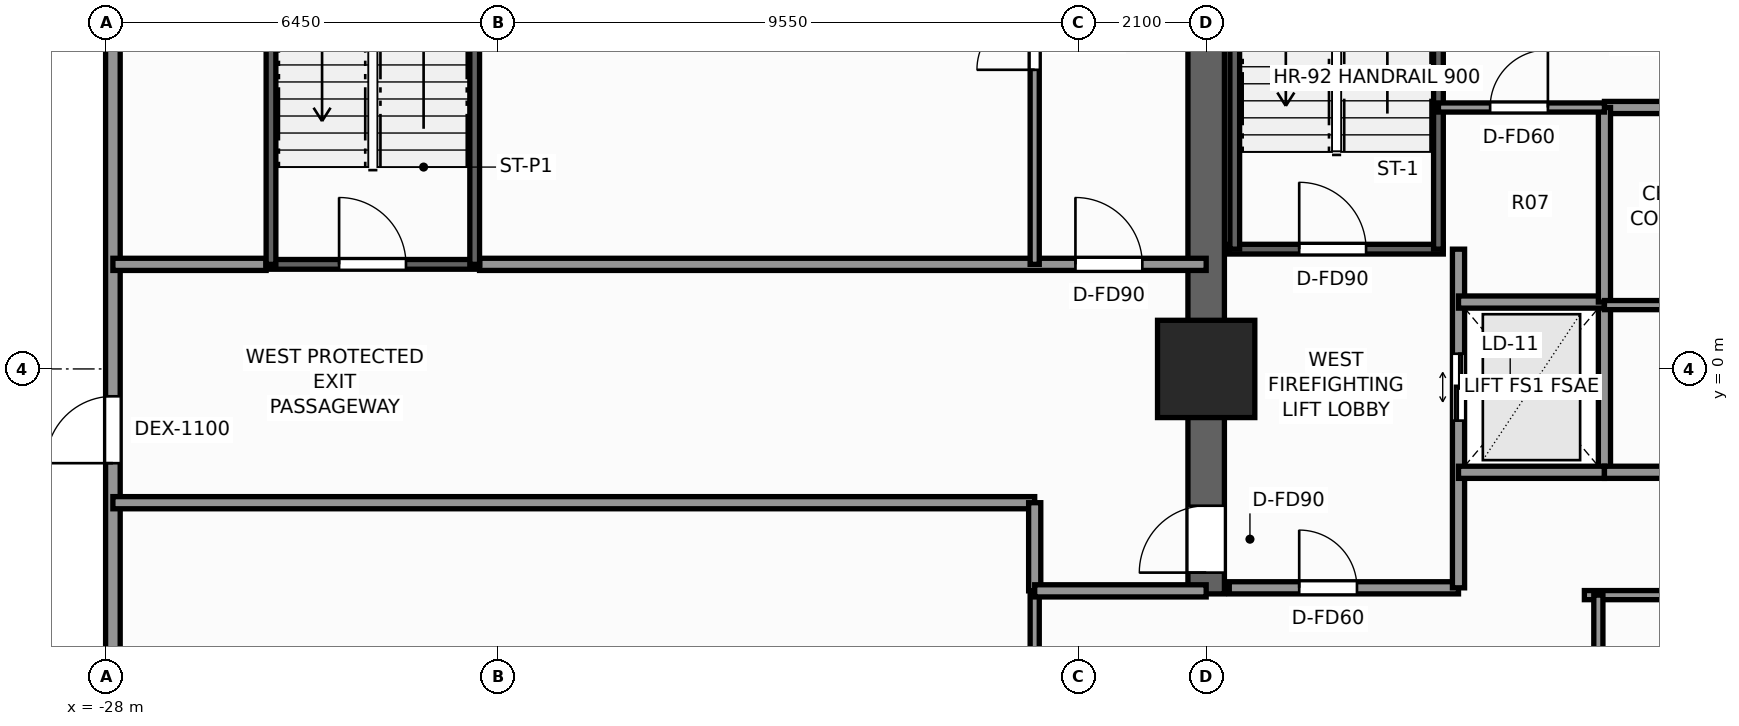
"""IFC4 building model, lengths in metres.
Left out: names, types, materials, properties, quantities, classifications, styles, units other than length and angle.
Written with IfcOpenShell. Run it as: python <this file> out.ifc"""

import sys

from ifc_helpers import new_model, si_unit, direction, frame, frame_2d, origin, origin_2d, place, context, subcontext, project, spatial, rectangle, extrude, element, fill, save


model = new_model("IFC4")
c1 = context("Model", 3, precision=1e-05, world=origin(), true_north=direction((0.0, 1.0)))
c2 = subcontext(c1, "Body", "Model", "MODEL_VIEW")
j1 = project(units=[si_unit("LENGTHUNIT", "METRE"), si_unit("PLANEANGLEUNIT", "RADIAN")], contexts=[c1])
p1 = place(None, origin())
s1 = spatial("IfcSite", under=j1, at=p1, CompositionType="ELEMENT")
p2 = place(p1, origin())
s2 = spatial("IfcBuilding", under=s1, at=p2, CompositionType="ELEMENT")
p3 = place(p2, origin())
s3 = spatial("IfcBuildingStorey", under=s2, at=p3, CompositionType="ELEMENT", Elevation=0.0)
p4 = place(p3, frame((-9.9, -3.7, 0.0), z_axis=(0.0, 0.0, 1.0), x_axis=(0.0, 1.0, 0.0)))
e1 = element("IfcWall", 1, at=p4, inside=s3, PredefinedType="SHEAR", context=c2, shape_type="SweptSolid", body=[
    extrude(rectangle(XDim=13.3, YDim=0.6, at=frame_2d((6.65, 0.0))), origin(), (0.0, 0.0, 1.0), 5.5),
])
p5 = place(p4, frame((0.35, 0.0, 0.0)))
e2 = element("IfcOpeningElement", 2, at=p5, cuts=e1, PredefinedType="OPENING", context=c2, shape_type="SweptSolid", body=[
    extrude(rectangle(XDim=1.1, YDim=2.2, at=frame_2d((0.55, 1.1))), frame((0.0, 0.31, 0.0), z_axis=(0.0, -1.0, 0.0), x_axis=(1.0, 0.0, 0.0)), (0.0, 0.0, 1.0), 0.62),
])
p6 = place(p3, frame((-9.9, 0.0, 0.0), z_axis=(0.0, 0.0, 1.0), x_axis=(1.0, 0.0, 0.0)))
e3 = element("IfcColumn", 3, at=p6, inside=s3, PredefinedType="COLUMN", context=c2, shape_type="SweptSolid", body=[
    extrude(rectangle(XDim=1.6, YDim=1.6, at=origin_2d()), origin(), (0.0, 0.0, 1.0), 5.5),
])
p7 = place(p3, frame((-27.88, -28.4, 0.0), z_axis=(0.0, 0.0, 1.0), x_axis=(0.0, 1.0, 0.0)))
e4 = element("IfcWall", 4, at=p7, inside=s3, PredefinedType="STANDARD", context=c2, shape_type="SweptSolid", body=[
    extrude(rectangle(XDim=56.8, YDim=0.24, at=frame_2d((28.4, 0.0))), origin(), (0.0, 0.0, 1.0), 4.748),
])
p8 = place(p7, frame((26.85, 0.0, 0.0)))
e5 = element("IfcOpeningElement", 5, at=p8, cuts=e4, PredefinedType="OPENING", context=c2, shape_type="SweptSolid", body=[
    extrude(rectangle(XDim=1.1, YDim=2.2, at=frame_2d((0.55, 1.1))), frame((0.0, 0.13, 0.0), z_axis=(0.0, -1.0, 0.0), x_axis=(1.0, 0.0, 0.0)), (0.0, 0.0, 1.0), 0.26),
])
p9 = place(p7, frame((40.45, 0.0, 0.0)))
e6 = element("IfcOpeningElement", 6, at=p9, cuts=e4, PredefinedType="OPENING", context=c2, shape_type="SweptSolid", body=[
    extrude(rectangle(XDim=1.1, YDim=2.2, at=frame_2d((0.55, 1.1))), frame((0.0, 0.13, 0.0), z_axis=(0.0, -1.0, 0.0), x_axis=(1.0, 0.0, 0.0)), (0.0, 0.0, 1.0), 0.26),
])
p10 = place(p7, frame((47.35, 0.0, 0.0)))
e7 = element("IfcOpeningElement", 7, at=p10, cuts=e4, PredefinedType="OPENING", context=c2, shape_type="SweptSolid", body=[
    extrude(rectangle(XDim=1.1, YDim=2.2, at=frame_2d((0.55, 1.1))), frame((0.0, 0.13, 0.0), z_axis=(0.0, -1.0, 0.0), x_axis=(1.0, 0.0, 0.0)), (0.0, 0.0, 1.0), 0.26),
])
p11 = place(p7, frame((6.0, 0.0, 0.75)))
e8 = element("IfcOpeningElement", 8, at=p11, cuts=e4, PredefinedType="OPENING", context=c2, shape_type="SweptSolid", body=[
    extrude(rectangle(XDim=1.8, YDim=2.4, at=frame_2d((0.9, 1.2))), frame((0.0, 0.13, 0.0), z_axis=(0.0, -1.0, 0.0), x_axis=(1.0, 0.0, 0.0)), (0.0, 0.0, 1.0), 0.26),
])
p12 = place(p7, frame((11.0, 0.0, 0.75)))
e9 = element("IfcOpeningElement", 9, at=p12, cuts=e4, PredefinedType="OPENING", context=c2, shape_type="SweptSolid", body=[
    extrude(rectangle(XDim=1.8, YDim=2.4, at=frame_2d((0.9, 1.2))), frame((0.0, 0.13, 0.0), z_axis=(0.0, -1.0, 0.0), x_axis=(1.0, 0.0, 0.0)), (0.0, 0.0, 1.0), 0.26),
])
p13 = place(p7, frame((21.7, 0.0, 0.75)))
e10 = element("IfcOpeningElement", 10, at=p13, cuts=e4, PredefinedType="OPENING", context=c2, shape_type="SweptSolid", body=[
    extrude(rectangle(XDim=1.8, YDim=2.4, at=frame_2d((0.9, 1.2))), frame((0.0, 0.13, 0.0), z_axis=(0.0, -1.0, 0.0), x_axis=(1.0, 0.0, 0.0)), (0.0, 0.0, 1.0), 0.26),
])
p14 = place(p3, frame((-9.52, 1.97, 0.0), z_axis=(0.0, 0.0, 1.0), x_axis=(1.0, 0.0, 0.0)))
e11 = element("IfcWall", 11, at=p14, inside=s3, PredefinedType="SHEAR", context=c2, shape_type="SweptSolid", body=[
    extrude(rectangle(XDim=3.52, YDim=0.16, at=frame_2d((1.76, 0.0))), origin(), (0.0, 0.0, 1.0), 5.5),
])
p15 = place(p14, frame((1.15, 0.0, 0.0)))
e12 = element("IfcOpeningElement", 12, at=p15, cuts=e11, PredefinedType="OPENING", context=c2, shape_type="SweptSolid", body=[
    extrude(rectangle(XDim=1.1, YDim=2.2, at=frame_2d((0.55, 1.1))), frame((0.0, 0.09, 0.0), z_axis=(0.0, -1.0, 0.0), x_axis=(1.0, 0.0, 0.0)), (0.0, 0.0, 1.0), 0.18),
])
for number, where, z_axis, x_axis in (
    (13, (-9.43, 1.97, 0.0), (0.0, 0.0, 1.0), (0.0, 1.0, 0.0)),
    (14, (-6.08, 1.97, 0.0), (0.0, 0.0, 1.0), (0.0, 1.0, 0.0)),
):
    element("IfcWall", number, at=place(p3, frame(where, z_axis=z_axis, x_axis=x_axis)), inside=s3, PredefinedType="SHEAR", context=c2, shape_type="SweptSolid", body=[
        extrude(rectangle(XDim=7.56, YDim=0.16, at=frame_2d((3.78, 0.0))), origin(), (0.0, 0.0, 1.0), 5.5),
    ])
p16 = place(p3, frame((-9.52, -3.6, 0.0), z_axis=(0.0, 0.0, 1.0), x_axis=(1.0, 0.0, 0.0)))
e15 = element("IfcWall", 15, at=p16, inside=s3, PredefinedType="SOLIDWALL", context=c2, shape_type="SweptSolid", body=[
    extrude(rectangle(XDim=3.77, YDim=0.2, at=frame_2d((1.885, 0.0))), origin(), (0.0, 0.0, 1.0), 5.22),
])
p17 = place(p16, frame((1.15, 0.0, 0.0)))
e16 = element("IfcOpeningElement", 16, at=p17, cuts=e15, PredefinedType="OPENING", context=c2, shape_type="SweptSolid", body=[
    extrude(rectangle(XDim=0.95, YDim=2.06, at=frame_2d((0.475, 1.03))), frame((0.0, 0.11, 0.0), z_axis=(0.0, -1.0, 0.0), x_axis=(1.0, 0.0, 0.0)), (0.0, 0.0, 1.0), 0.22),
])
p18 = place(p3, frame((-5.75, -3.6, 0.0), z_axis=(0.0, 0.0, 1.0), x_axis=(0.0, 1.0, 0.0)))
e17 = element("IfcWall", 17, at=p18, inside=s3, PredefinedType="SOLIDWALL", context=c2, shape_type="SweptSolid", body=[
    extrude(rectangle(XDim=5.57, YDim=0.2, at=frame_2d((2.785, 0.0))), origin(), (0.0, 0.0, 1.0), 5.22),
])
p19 = place(p18, frame((2.75, 0.0, 0.0)))
e18 = element("IfcOpeningElement", 18, at=p19, cuts=e17, PredefinedType="OPENING", context=c2, shape_type="SweptSolid", body=[
    extrude(rectangle(XDim=1.1, YDim=2.2, at=frame_2d((0.55, 1.1))), frame((0.0, 0.11, 0.0), z_axis=(0.0, -1.0, 0.0), x_axis=(1.0, 0.0, 0.0)), (0.0, 0.0, 1.0), 0.22),
])
p20 = place(p3, frame((-3.35, -1.7, 0.0), z_axis=(0.0, 0.0, 1.0), x_axis=(0.0, 1.0, 0.0)))
e19 = element("IfcWall", 19, at=p20, inside=s3, PredefinedType="SOLIDWALL", context=c2, shape_type="SweptSolid", body=[
    extrude(rectangle(XDim=2.8, YDim=0.2, at=frame_2d((1.4, 0.0))), origin(), (0.0, 0.0, 1.0), 5.22),
])
for number, where, z_axis, x_axis in (
    (20, (-5.75, -1.7, 0.0), (0.0, 0.0, 1.0), (1.0, 0.0, 0.0)),
    (21, (-5.75, 1.1, 0.0), (0.0, 0.0, 1.0), (1.0, 0.0, 0.0)),
):
    element("IfcWall", number, at=place(p3, frame(where, z_axis=z_axis, x_axis=x_axis)), inside=s3, PredefinedType="SOLIDWALL", context=c2, shape_type="SweptSolid", body=[
        extrude(rectangle(XDim=2.4, YDim=0.2, at=frame_2d((1.2, 0.0))), origin(), (0.0, 0.0, 1.0), 5.22),
    ])
p21 = place(p3, frame((-3.35, 4.3, 0.0), z_axis=(0.0, 0.0, 1.0), x_axis=(1.0, 0.0, 0.0)))
e22 = element("IfcWall", 22, at=p21, inside=s3, PredefinedType="SOLIDWALL", context=c2, shape_type="SweptSolid", body=[
    extrude(rectangle(XDim=6.7, YDim=0.2, at=frame_2d((3.35, 0.0))), origin(), (0.0, 0.0, 1.0), 5.22),
])
p22 = place(p21, frame((4.35, 0.0, 0.0)))
e23 = element("IfcOpeningElement", 23, at=p22, cuts=e22, PredefinedType="OPENING", context=c2, shape_type="SweptSolid", body=[
    extrude(rectangle(XDim=0.95, YDim=2.06, at=frame_2d((0.475, 1.03))), frame((0.0, 0.11, 0.0), z_axis=(0.0, -1.0, 0.0), x_axis=(1.0, 0.0, 0.0)), (0.0, 0.0, 1.0), 0.22),
])
p23 = place(p3, frame((-3.35, -1.7, 0.0), z_axis=(0.0, 0.0, 1.0), x_axis=(1.0, 0.0, 0.0)))
e24 = element("IfcWall", 24, at=p23, inside=s3, PredefinedType="SOLIDWALL", context=c2, shape_type="SweptSolid", body=[
    extrude(rectangle(XDim=6.7, YDim=0.2, at=frame_2d((3.35, 0.0))), origin(), (0.0, 0.0, 1.0), 5.22),
])
p24 = place(p3, frame((-3.35, 1.1, 0.0), z_axis=(0.0, 0.0, 1.0), x_axis=(0.0, 1.0, 0.0)))
e25 = element("IfcWall", 25, at=p24, inside=s3, PredefinedType="SOLIDWALL", context=c2, shape_type="SweptSolid", body=[
    extrude(rectangle(XDim=3.2, YDim=0.2, at=frame_2d((1.6, 0.0))), origin(), (0.0, 0.0, 1.0), 5.22),
])
p25 = place(p3, frame((-3.35, 1.05, 0.0), z_axis=(0.0, 0.0, 1.0), x_axis=(1.0, 0.0, 0.0)))
e26 = element("IfcWall", 26, at=p25, inside=s3, PredefinedType="PARTITIONING", context=c2, shape_type="SweptSolid", body=[
    extrude(rectangle(XDim=6.7, YDim=0.15, at=frame_2d((3.35, 0.0))), origin(), (0.0, 0.0, 1.0), 5.22),
])
p26 = place(p25, frame((4.2, 0.0, 0.0)))
e27 = element("IfcOpeningElement", 27, at=p26, cuts=e26, PredefinedType="OPENING", context=c2, shape_type="SweptSolid", body=[
    extrude(rectangle(XDim=0.85, YDim=2.03, at=frame_2d((0.425, 1.015))), frame((0.0, 0.085, 0.0), z_axis=(0.0, -1.0, 0.0), x_axis=(1.0, 0.0, 0.0)), (0.0, 0.0, 1.0), 0.17),
])
p27 = place(p3, frame((-3.68, -3.72, 0.0), z_axis=(0.0, 0.0, 1.0), x_axis=(1.0, 0.0, 0.0)))
e28 = element("IfcWall", 28, at=p27, inside=s3, PredefinedType="PARTITIONING", context=c2, shape_type="SweptSolid", body=[
    extrude(rectangle(XDim=7.36, YDim=0.15, at=frame_2d((3.68, 0.0))), origin(), (0.0, 0.0, 1.0), 5.22),
])
p28 = place(p3, frame((-3.45, -6.08, 0.0), z_axis=(0.0, 0.0, 1.0), x_axis=(0.0, 1.0, 0.0)))
e29 = element("IfcWall", 29, at=p28, inside=s3, PredefinedType="PARTITIONING", context=c2, shape_type="SweptSolid", body=[
    extrude(rectangle(XDim=2.36, YDim=0.15, at=frame_2d((1.18, 0.0))), origin(), (0.0, 0.0, 1.0), 5.22),
])
p29 = place(p3, frame((-6.08, 4.3, 0.0), z_axis=(0.0, 0.0, 1.0), x_axis=(1.0, 0.0, 0.0)))
e30 = element("IfcWall", 30, at=p29, inside=s3, PredefinedType="PARTITIONING", context=c2, shape_type="SweptSolid", body=[
    extrude(rectangle(XDim=2.73, YDim=0.15, at=frame_2d((1.365, 0.0))), origin(), (0.0, 0.0, 1.0), 5.22),
])
p30 = place(p29, frame((0.85, 0.0, 0.0)))
e31 = element("IfcOpeningElement", 31, at=p30, cuts=e30, PredefinedType="OPENING", context=c2, shape_type="SweptSolid", body=[
    extrude(rectangle(XDim=0.95, YDim=2.06, at=frame_2d((0.475, 1.03))), frame((0.0, 0.085, 0.0), z_axis=(0.0, -1.0, 0.0), x_axis=(1.0, 0.0, 0.0)), (0.0, 0.0, 1.0), 0.17),
])
p31 = place(p3, frame((-12.72, -28.28, 0.0), z_axis=(0.0, 0.0, 1.0), x_axis=(0.0, 1.0, 0.0)))
e32 = element("IfcWall", 32, at=p31, inside=s3, PredefinedType="PARTITIONING", context=c2, shape_type="SweptSolid", body=[
    extrude(rectangle(XDim=24.63, YDim=0.15, at=frame_2d((12.315, 0.0))), origin(), (0.0, 0.0, 1.0), 4.278),
])
p32 = place(p31, frame((10.0, 0.0, 0.0)))
e33 = element("IfcOpeningElement", 33, at=p32, cuts=e32, PredefinedType="OPENING", context=c2, shape_type="SweptSolid", body=[
    extrude(rectangle(XDim=1.6, YDim=2.3, at=frame_2d((0.8, 1.15))), frame((0.0, 0.085, 0.0), z_axis=(0.0, -1.0, 0.0), x_axis=(1.0, 0.0, 0.0)), (0.0, 0.0, 1.0), 0.17),
])
p33 = place(p3, frame((-27.88, -2.2, 0.0), z_axis=(0.0, 0.0, 1.0), x_axis=(1.0, 0.0, 0.0)))
e34 = element("IfcWall", 34, at=p33, inside=s3, PredefinedType="SOLIDWALL", context=c2, shape_type="SweptSolid", body=[
    extrude(rectangle(XDim=15.16, YDim=0.2, at=frame_2d((7.58, 0.0))), origin(), (0.0, 0.0, 1.0), 4.589),
])
p34 = place(p3, frame((-12.72, -3.65, 0.0), z_axis=(0.0, 0.0, 1.0), x_axis=(0.0, 1.0, 0.0)))
e35 = element("IfcWall", 35, at=p34, inside=s3, PredefinedType="SOLIDWALL", context=c2, shape_type="SweptSolid", body=[
    extrude(rectangle(XDim=1.45, YDim=0.2, at=frame_2d((0.725, 0.0))), origin(), (0.0, 0.0, 1.0), 4.745),
])
p35 = place(p3, frame((-12.72, -3.65, 0.0), z_axis=(0.0, 0.0, 1.0), x_axis=(1.0, 0.0, 0.0)))
e36 = element("IfcWall", 36, at=p35, inside=s3, PredefinedType="SOLIDWALL", context=c2, shape_type="SweptSolid", body=[
    extrude(rectangle(XDim=2.82, YDim=0.2, at=frame_2d((1.41, 0.0))), origin(), (0.0, 0.0, 1.0), 4.255),
])
p36 = place(p3, frame((-27.88, 1.72, 0.0), z_axis=(0.0, 0.0, 1.0), x_axis=(1.0, 0.0, 0.0)))
e37 = element("IfcWall", 37, at=p36, inside=s3, PredefinedType="SOLIDWALL", context=c2, shape_type="SweptSolid", body=[
    extrude(rectangle(XDim=2.52, YDim=0.2, at=frame_2d((1.26, 0.0))), origin(), (0.0, 0.0, 1.0), 4.589),
])
p37 = place(p3, frame((-21.85, 1.72, 0.0), z_axis=(0.0, 0.0, 1.0), x_axis=(1.0, 0.0, 0.0)))
e38 = element("IfcWall", 38, at=p37, inside=s3, PredefinedType="SOLIDWALL", context=c2, shape_type="SweptSolid", body=[
    extrude(rectangle(XDim=11.95, YDim=0.2, at=frame_2d((5.975, 0.0))), origin(), (0.0, 0.0, 1.0), 5.22),
])
p38 = place(p37, frame((9.8, 0.0, 0.0)))
e39 = element("IfcOpeningElement", 39, at=p38, cuts=e38, PredefinedType="OPENING", context=c2, shape_type="SweptSolid", body=[
    extrude(rectangle(XDim=1.1, YDim=2.2, at=frame_2d((0.55, 1.1))), frame((0.0, 0.11, 0.0), z_axis=(0.0, -1.0, 0.0), x_axis=(1.0, 0.0, 0.0)), (0.0, 0.0, 1.0), 0.22),
])
p39 = place(p3, frame((-12.72, 1.72, 0.0), z_axis=(0.0, 0.0, 1.0), x_axis=(0.0, 1.0, 0.0)))
e40 = element("IfcWall", 40, at=p39, inside=s3, PredefinedType="PARTITIONING", context=c2, shape_type="SweptSolid", body=[
    extrude(rectangle(XDim=11.0, YDim=0.15, at=frame_2d((5.5, 0.0))), origin(), (0.0, 0.0, 1.0), 4.278),
])
p40 = place(p39, frame((3.2, 0.0, 0.0)))
e41 = element("IfcOpeningElement", 41, at=p40, cuts=e40, PredefinedType="OPENING", context=c2, shape_type="SweptSolid", body=[
    extrude(rectangle(XDim=0.95, YDim=2.06, at=frame_2d((0.475, 1.03))), frame((0.0, 0.085, 0.0), z_axis=(0.0, -1.0, 0.0), x_axis=(1.0, 0.0, 0.0)), (0.0, 0.0, 1.0), 0.17),
])
p41 = place(p3, frame((-25.36, 1.72, 0.0), z_axis=(0.0, 0.0, 1.0), x_axis=(1.0, 0.0, 0.0)))
e42 = element("IfcWall", 42, at=p41, inside=s3, PredefinedType="SHEAR", context=c2, shape_type="SweptSolid", body=[
    extrude(rectangle(XDim=3.51, YDim=0.16, at=frame_2d((1.755, 0.0))), origin(), (0.0, 0.0, 1.0), 5.5),
])
p42 = place(p41, frame((1.2, 0.0, 0.0)))
e43 = element("IfcOpeningElement", 43, at=p42, cuts=e42, PredefinedType="OPENING", context=c2, shape_type="SweptSolid", body=[
    extrude(rectangle(XDim=1.1, YDim=2.2, at=frame_2d((0.55, 1.1))), frame((0.0, 0.09, 0.0), z_axis=(0.0, -1.0, 0.0), x_axis=(1.0, 0.0, 0.0)), (0.0, 0.0, 1.0), 0.18),
])
for number, where, z_axis, x_axis in (
    (44, (-25.28, 1.72, 0.0), (0.0, 0.0, 1.0), (0.0, 1.0, 0.0)),
    (45, (-21.93, 1.72, 0.0), (0.0, 0.0, 1.0), (0.0, 1.0, 0.0)),
):
    element("IfcWall", number, at=place(p3, frame(where, z_axis=z_axis, x_axis=x_axis)), inside=s3, PredefinedType="SHEAR", context=c2, shape_type="SweptSolid", body=[
        extrude(rectangle(XDim=7.56, YDim=0.16, at=frame_2d((3.78, 0.0))), origin(), (0.0, 0.0, 1.0), 5.5),
    ])
p43 = place(p8, origin())
e46 = element("IfcDoor", 46, at=p43, inside=s3, OperationType="SINGLE_SWING_LEFT", PredefinedType="DOOR", context=c2, shape_type="SweptSolid", body=[
    extrude(rectangle(XDim=1.1, YDim=2.2, at=frame_2d((0.55, 1.1))), frame((0.0, 0.025, 0.0), z_axis=(0.0, -1.0, 0.0), x_axis=(1.0, 0.0, 0.0)), (0.0, 0.0, 1.0), 0.05),
])
fill(e5, e46)
p44 = place(p15, origin())
e47 = element("IfcDoor", 47, at=p44, inside=s3, OperationType="SINGLE_SWING_LEFT", PredefinedType="DOOR", context=c2, shape_type="SweptSolid", body=[
    extrude(rectangle(XDim=1.1, YDim=2.2, at=frame_2d((0.55, 1.1))), frame((0.0, 0.025, 0.0), z_axis=(0.0, -1.0, 0.0), x_axis=(1.0, 0.0, 0.0)), (0.0, 0.0, 1.0), 0.05),
])
fill(e12, e47)
p45 = place(p5, origin())
e48 = element("IfcDoor", 48, at=p45, inside=s3, OperationType="SINGLE_SWING_LEFT", PredefinedType="DOOR", context=c2, shape_type="SweptSolid", body=[
    extrude(rectangle(XDim=1.1, YDim=2.2, at=frame_2d((0.55, 1.1))), frame((0.0, 0.025, 0.0), z_axis=(0.0, -1.0, 0.0), x_axis=(1.0, 0.0, 0.0)), (0.0, 0.0, 1.0), 0.05),
])
fill(e2, e48)
p46 = place(p19, origin())
e49 = element("IfcDoor", 49, at=p46, inside=s3, OperationType="DOUBLE_DOOR_SLIDING", PredefinedType="DOOR", context=c2, shape_type="SweptSolid", body=[
    extrude(rectangle(XDim=1.1, YDim=2.2, at=frame_2d((0.55, 1.1))), frame((0.0, 0.025, 0.0), z_axis=(0.0, -1.0, 0.0), x_axis=(1.0, 0.0, 0.0)), (0.0, 0.0, 1.0), 0.05),
])
fill(e18, e49)
p47 = place(p17, origin())
e50 = element("IfcDoor", 50, at=p47, inside=s3, OperationType="SINGLE_SWING_LEFT", PredefinedType="DOOR", context=c2, shape_type="SweptSolid", body=[
    extrude(rectangle(XDim=0.95, YDim=2.06, at=frame_2d((0.475, 1.03))), frame((0.0, 0.025, 0.0), z_axis=(0.0, -1.0, 0.0), x_axis=(1.0, 0.0, 0.0)), (0.0, 0.0, 1.0), 0.05),
])
fill(e16, e50)
p48 = place(p30, origin())
e51 = element("IfcDoor", 51, at=p48, inside=s3, OperationType="SINGLE_SWING_RIGHT", PredefinedType="DOOR", context=c2, shape_type="SweptSolid", body=[
    extrude(rectangle(XDim=0.95, YDim=2.06, at=frame_2d((0.475, 1.03))), frame((0.0, 0.025, 0.0), z_axis=(0.0, -1.0, 0.0), x_axis=(1.0, 0.0, 0.0)), (0.0, 0.0, 1.0), 0.05),
])
fill(e31, e51)
p49 = place(p38, origin())
e52 = element("IfcDoor", 52, at=p49, inside=s3, OperationType="SINGLE_SWING_LEFT", PredefinedType="DOOR", context=c2, shape_type="SweptSolid", body=[
    extrude(rectangle(XDim=1.1, YDim=2.2, at=frame_2d((0.55, 1.1))), frame((0.0, 0.025, 0.0), z_axis=(0.0, -1.0, 0.0), x_axis=(1.0, 0.0, 0.0)), (0.0, 0.0, 1.0), 0.05),
])
fill(e39, e52)
p50 = place(p40, origin())
e53 = element("IfcDoor", 53, at=p50, inside=s3, OperationType="SINGLE_SWING_LEFT", PredefinedType="DOOR", context=c2, shape_type="SweptSolid", body=[
    extrude(rectangle(XDim=0.95, YDim=2.06, at=frame_2d((0.475, 1.03))), frame((0.0, 0.025, 0.0), z_axis=(0.0, -1.0, 0.0), x_axis=(1.0, 0.0, 0.0)), (0.0, 0.0, 1.0), 0.05),
])
fill(e41, e53)
p51 = place(p42, origin())
e54 = element("IfcDoor", 54, at=p51, inside=s3, OperationType="SINGLE_SWING_LEFT", PredefinedType="DOOR", context=c2, shape_type="SweptSolid", body=[
    extrude(rectangle(XDim=1.1, YDim=2.2, at=frame_2d((0.55, 1.1))), frame((0.0, 0.025, 0.0), z_axis=(0.0, -1.0, 0.0), x_axis=(1.0, 0.0, 0.0)), (0.0, 0.0, 1.0), 0.05),
])
fill(e43, e54)
save(model, sys.argv[1])
